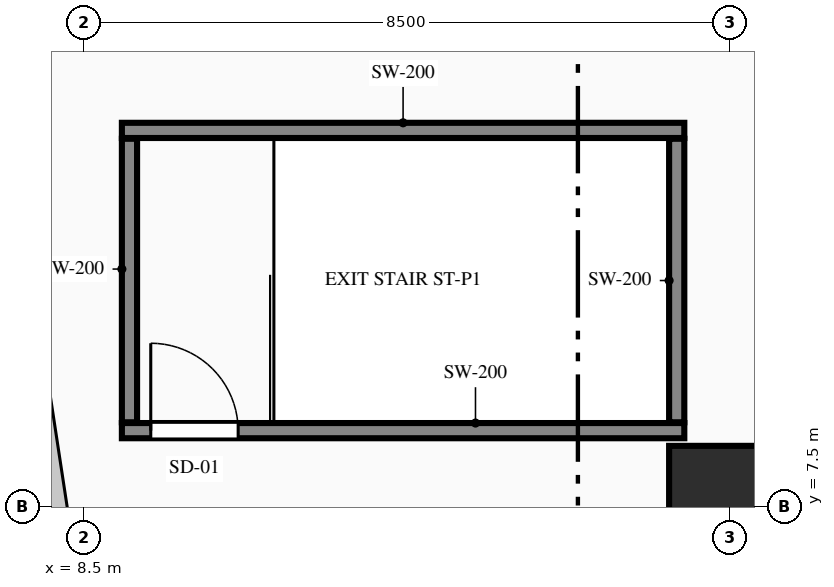
"""IFC4 building model, lengths in metres.
Left out: names, types, materials, properties, quantities, classifications, styles, units other than length and angle.
Written with IfcOpenShell. Run it as: python <this file> out.ifc"""

import sys

from ifc_helpers import new_model, si_unit, direction, frame, frame_2d, origin, origin_2d, place, context, subcontext, project, spatial, rectangle, extrude, element, fill, save


model = new_model("IFC4")
c1 = context("Model", 3, precision=1e-05, world=origin(), true_north=direction((0.0, 1.0)))
c2 = subcontext(c1, "Body", "Model", "MODEL_VIEW")
j1 = project(units=[si_unit("LENGTHUNIT", "METRE"), si_unit("PLANEANGLEUNIT", "RADIAN")], contexts=[c1])
p1 = place(None, origin())
s1 = spatial("IfcSite", under=j1, at=p1, CompositionType="ELEMENT")
p2 = place(p1, origin())
s2 = spatial("IfcBuilding", under=s1, at=p2, CompositionType="ELEMENT")
p3 = place(p2, frame((0.0, 0.0, 21.6)))
s3 = spatial("IfcBuildingStorey", under=s2, at=p3, CompositionType="ELEMENT", Elevation=21.6)
p4 = place(p3, frame((9.0, 8.5, 0.0), z_axis=(0.0, 0.0, 1.0), x_axis=(1.0, 0.0, 0.0)))
e1 = element("IfcWall", 1, at=p4, inside=s3, PredefinedType="SHEAR", context=c2, shape_type="SweptSolid", body=[
    extrude(rectangle(XDim=7.4, YDim=0.2, at=frame_2d((3.7, 0.0))), origin(), (0.0, 0.0, 1.0), 5.4),
])
p5 = place(p4, frame((0.38, 0.0, 0.0)))
e2 = element("IfcOpeningElement", 2, at=p5, cuts=e1, PredefinedType="OPENING", context=c2, shape_type="SweptSolid", body=[
    extrude(rectangle(XDim=1.15, YDim=2.2, at=frame_2d((0.575, 1.1))), frame((0.0, 0.11, 0.0), z_axis=(0.0, -1.0, 0.0), x_axis=(1.0, 0.0, 0.0)), (0.0, 0.0, 1.0), 0.22),
])
p6 = place(p3, frame((9.0, 12.45, 0.0), z_axis=(0.0, 0.0, 1.0), x_axis=(1.0, 0.0, 0.0)))
e3 = element("IfcWall", 3, at=p6, inside=s3, PredefinedType="SHEAR", context=c2, shape_type="SweptSolid", body=[
    extrude(rectangle(XDim=7.4, YDim=0.2, at=frame_2d((3.7, 0.0))), origin(), (0.0, 0.0, 1.0), 5.4),
])
for number, where, z_axis, x_axis in (
    (4, (9.1, 8.61, 0.0), (0.0, 0.0, 1.0), (0.0, 1.0, 0.0)),
    (5, (16.3, 8.61, 0.0), (0.0, 0.0, 1.0), (0.0, 1.0, 0.0)),
):
    element("IfcWall", number, at=place(p3, frame(where, z_axis=z_axis, x_axis=x_axis)), inside=s3, PredefinedType="SHEAR", context=c2, shape_type="SweptSolid", body=[
        extrude(rectangle(XDim=3.73, YDim=0.2, at=frame_2d((1.865, 0.0))), origin(), (0.0, 0.0, 1.0), 5.4),
    ])
p7 = place(p3, frame((17.0, 7.5, 0.0), z_axis=(0.0, 0.0, 1.0), x_axis=(1.0, 0.0, 0.0)))
e6 = element("IfcColumn", 6, at=p7, inside=s3, PredefinedType="COLUMN", context=c2, shape_type="SweptSolid", body=[
    extrude(rectangle(XDim=1.6, YDim=1.6, at=origin_2d()), origin(), (0.0, 0.0, 1.0), 5.4),
])
p8 = place(p3, frame((8.531, 4.85, 0.0), z_axis=(0.0, 0.0, 1.0), x_axis=(-0.150391137476, 0.988626575492, 0.0)))
e7 = element("IfcWall", 7, at=p8, inside=s3, PredefinedType="STANDARD", context=c2, shape_type="SweptSolid", body=[
    extrude(rectangle(XDim=36.718, YDim=0.3, at=frame_2d((18.359, 0.0))), origin(), (0.0, 0.0, 1.0), 5.0),
])
p9 = place(p5, origin())
e8 = element("IfcDoor", 8, at=p9, inside=s3, OperationType="SINGLE_SWING_LEFT", PredefinedType="DOOR", context=c2, shape_type="SweptSolid", body=[
    extrude(rectangle(XDim=1.15, YDim=2.2, at=frame_2d((0.575, 1.1))), frame((0.0, 0.025, 0.0), z_axis=(0.0, -1.0, 0.0), x_axis=(1.0, 0.0, 0.0)), (0.0, 0.0, 1.0), 0.05),
])
fill(e2, e8)
save(model, sys.argv[1])
